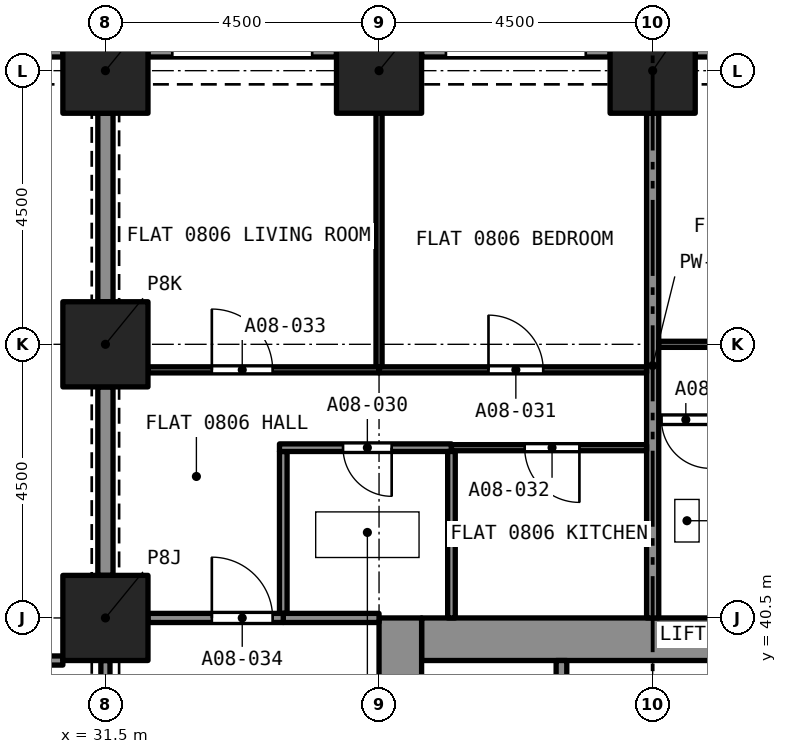
"""IFC4 building model, lengths in metres.
Left out: names, types, materials, properties, quantities, classifications, styles, units other than length and angle.
Written with IfcOpenShell. Run it as: python <this file> out.ifc"""

import sys

from ifc_helpers import new_model, si_unit, direction, frame, frame_2d, origin, origin_2d, place, context, subcontext, project, spatial, rectangle, extrude, element, fill, save


model = new_model("IFC4")
c1 = context("Model", 3, precision=1e-05, world=origin(), true_north=direction((0.0, 1.0)))
c2 = subcontext(c1, "Body", "Model", "MODEL_VIEW")
j1 = project(units=[si_unit("LENGTHUNIT", "METRE"), si_unit("PLANEANGLEUNIT", "RADIAN")], contexts=[c1])
p1 = place(None, origin())
s1 = spatial("IfcSite", under=j1, at=p1, CompositionType="ELEMENT")
p2 = place(p1, origin())
s2 = spatial("IfcBuilding", under=s1, at=p2, CompositionType="ELEMENT")
p3 = place(p2, frame((0.0, 0.0, 36.8)))
s3 = spatial("IfcBuildingStorey", under=s2, at=p3, CompositionType="ELEMENT", Elevation=36.8)
for number, where, z_axis, x_axis in (
    (1, (31.5, 40.5, 0.0), (0.0, 0.0, 1.0), (1.0, 0.0, 0.0)),
    (2, (31.5, 45.0, 0.0), (0.0, 0.0, 1.0), (1.0, 0.0, 0.0)),
    (3, (31.5, 49.5, 0.0), (0.0, 0.0, 1.0), (1.0, 0.0, 0.0)),
    (4, (36.0, 49.5, 0.0), (0.0, 0.0, 1.0), (1.0, 0.0, 0.0)),
    (5, (40.5, 49.5, 0.0), (0.0, 0.0, 1.0), (1.0, 0.0, 0.0)),
):
    element("IfcColumn", number, at=place(p3, frame(where, z_axis=z_axis, x_axis=x_axis)), inside=s3, PredefinedType="COLUMN", context=c2, shape_type="SweptSolid", body=[
        extrude(rectangle(XDim=1.4, YDim=1.4, at=origin_2d()), origin(), (0.0, 0.0, 1.0), 3.2),
    ])
p4 = place(p3, frame((36.7, 40.15, 0.0), z_axis=(0.0, 0.0, 1.0), x_axis=(1.0, 0.0, 0.0)))
e6 = element("IfcWall", 6, at=p4, inside=s3, PredefinedType="SOLIDWALL", context=c2, shape_type="SweptSolid", body=[
    extrude(rectangle(XDim=7.6, YDim=0.7, at=frame_2d((3.8, 0.0))), origin(), (0.0, 0.0, 1.0), 3.2),
])
p5 = place(p3, frame((36.35, 27.0, 0.0), z_axis=(0.0, 0.0, 1.0), x_axis=(0.0, 1.0, 0.0)))
e7 = element("IfcWall", 7, at=p5, inside=s3, PredefinedType="SOLIDWALL", context=c2, shape_type="SweptSolid", body=[
    extrude(rectangle(XDim=13.5, YDim=0.7, at=frame_2d((6.75, 0.0))), origin(), (0.0, 0.0, 1.0), 3.2),
])
p6 = place(p5, frame((8.95, 0.0, 0.0)))
e8 = element("IfcOpeningElement", 8, at=p6, cuts=e7, PredefinedType="OPENING", context=c2, shape_type="SweptSolid", body=[
    extrude(rectangle(XDim=1.2, YDim=2.1, at=frame_2d((0.6, 1.05))), frame((0.0, 0.36, 0.0), z_axis=(0.0, -1.0, 0.0), x_axis=(1.0, 0.0, 0.0)), (0.0, 0.0, 1.0), 0.72),
])
p7 = place(p3, frame((41.2, 49.875, 0.0), z_axis=(0.0, 0.0, 1.0), x_axis=(1.0, 0.0, 0.0)))
e9 = element("IfcWall", 9, at=p7, inside=s3, PredefinedType="SOLIDWALL", context=c2, shape_type="SweptSolid", body=[
    extrude(rectangle(XDim=3.1, YDim=0.3, at=frame_2d((1.55, 0.0))), origin(), (0.0, 0.0, 1.0), 3.2),
])
p8 = place(p7, frame((0.4, 0.0, 0.45)))
e10 = element("IfcOpeningElement", 10, at=p8, cuts=e9, PredefinedType="OPENING", context=c2, shape_type="SweptSolid", body=[
    extrude(rectangle(XDim=2.3, YDim=1.95, at=frame_2d((1.15, 0.975))), frame((0.0, 0.16, 0.0), z_axis=(0.0, -1.0, 0.0), x_axis=(1.0, 0.0, 0.0)), (0.0, 0.0, 1.0), 0.32),
])
p9 = place(p3, frame((36.7, 49.875, 0.0), z_axis=(0.0, 0.0, 1.0), x_axis=(1.0, 0.0, 0.0)))
e11 = element("IfcWall", 11, at=p9, inside=s3, PredefinedType="SOLIDWALL", context=c2, shape_type="SweptSolid", body=[
    extrude(rectangle(XDim=3.1, YDim=0.3, at=frame_2d((1.55, 0.0))), origin(), (0.0, 0.0, 1.0), 3.2),
])
p10 = place(p9, frame((0.4, 0.0, 0.45)))
e12 = element("IfcOpeningElement", 12, at=p10, cuts=e11, PredefinedType="OPENING", context=c2, shape_type="SweptSolid", body=[
    extrude(rectangle(XDim=2.3, YDim=1.95, at=frame_2d((1.15, 0.975))), frame((0.0, 0.16, 0.0), z_axis=(0.0, -1.0, 0.0), x_axis=(1.0, 0.0, 0.0)), (0.0, 0.0, 1.0), 0.32),
])
p11 = place(p3, frame((32.2, 49.875, 0.0), z_axis=(0.0, 0.0, 1.0), x_axis=(1.0, 0.0, 0.0)))
e13 = element("IfcWall", 13, at=p11, inside=s3, PredefinedType="SOLIDWALL", context=c2, shape_type="SweptSolid", body=[
    extrude(rectangle(XDim=3.1, YDim=0.3, at=frame_2d((1.55, 0.0))), origin(), (0.0, 0.0, 1.0), 3.2),
])
p12 = place(p11, frame((0.4, 0.0, 0.45)))
e14 = element("IfcOpeningElement", 14, at=p12, cuts=e13, PredefinedType="OPENING", context=c2, shape_type="SweptSolid", body=[
    extrude(rectangle(XDim=2.3, YDim=1.95, at=frame_2d((1.15, 0.975))), frame((0.0, 0.16, 0.0), z_axis=(0.0, -1.0, 0.0), x_axis=(1.0, 0.0, 0.0)), (0.0, 0.0, 1.0), 0.32),
])
p13 = place(p3, frame((27.7, 49.875, 0.0), z_axis=(0.0, 0.0, 1.0), x_axis=(1.0, 0.0, 0.0)))
e15 = element("IfcWall", 15, at=p13, inside=s3, PredefinedType="SOLIDWALL", context=c2, shape_type="SweptSolid", body=[
    extrude(rectangle(XDim=3.1, YDim=0.3, at=frame_2d((1.55, 0.0))), origin(), (0.0, 0.0, 1.0), 3.2),
])
p14 = place(p13, frame((0.4, 0.0, 0.45)))
e16 = element("IfcOpeningElement", 16, at=p14, cuts=e15, PredefinedType="OPENING", context=c2, shape_type="SweptSolid", body=[
    extrude(rectangle(XDim=2.3, YDim=1.95, at=frame_2d((1.15, 0.975))), frame((0.0, 0.16, 0.0), z_axis=(0.0, -1.0, 0.0), x_axis=(1.0, 0.0, 0.0)), (0.0, 0.0, 1.0), 0.32),
])
p15 = place(p3, frame((41.591, 43.76, 0.0), z_axis=(0.0, 0.0, 1.0), x_axis=(-1.0, 0.0, 0.0)))
e17 = element("IfcWall", 17, at=p15, inside=s3, PredefinedType="PARTITIONING", context=c2, shape_type="SweptSolid", body=[
    extrude(rectangle(XDim=0.991, YDim=0.125, at=frame_2d((0.495, 0.0))), origin(), (0.0, 0.0, 1.0), 2.9),
])
p16 = place(p15, frame((0.146, 0.0, 0.0)))
e18 = element("IfcOpeningElement", 18, at=p16, cuts=e17, PredefinedType="OPENING", context=c2, shape_type="SweptSolid", body=[
    extrude(rectangle(XDim=0.8, YDim=2.1, at=frame_2d((0.4, 1.05))), frame((0.0, 0.073, 0.0), z_axis=(0.0, -1.0, 0.0), x_axis=(1.0, 0.0, 0.0)), (0.0, 0.0, 1.0), 0.145),
])
p17 = place(p3, frame((40.5, 40.5, 0.0), z_axis=(0.0, 0.0, 1.0), x_axis=(0.0, 1.0, 0.0)))
e19 = element("IfcWall", 19, at=p17, inside=s3, PredefinedType="PARTITIONING", context=c2, shape_type="SweptSolid", body=[
    extrude(rectangle(XDim=8.3, YDim=0.2, at=frame_2d((4.15, 0.0))), origin(), (0.0, 0.0, 1.0), 2.9),
])
p18 = place(p3, frame((40.6, 45.0, 0.0), z_axis=(0.0, 0.0, 1.0), x_axis=(1.0, 0.0, 0.0)))
e20 = element("IfcWall", 20, at=p18, inside=s3, PredefinedType="PARTITIONING", context=c2, shape_type="SweptSolid", body=[
    extrude(rectangle(XDim=4.4, YDim=0.1, at=frame_2d((2.2, 0.0))), origin(), (0.0, 0.0, 1.0), 2.9),
])
p19 = place(p18, frame((1.7, 0.0, 0.0)))
e21 = element("IfcOpeningElement", 21, at=p19, cuts=e20, PredefinedType="OPENING", context=c2, shape_type="SweptSolid", body=[
    extrude(rectangle(XDim=0.9, YDim=2.1, at=frame_2d((0.45, 1.05))), frame((0.0, 0.06, 0.0), z_axis=(0.0, -1.0, 0.0), x_axis=(1.0, 0.0, 0.0)), (0.0, 0.0, 1.0), 0.12),
])
p20 = place(p3, frame((34.425, 40.575, 0.0), z_axis=(0.0, 0.0, 1.0), x_axis=(0.0, 1.0, 0.0)))
e22 = element("IfcWall", 22, at=p20, inside=s3, PredefinedType="PARTITIONING", context=c2, shape_type="SweptSolid", body=[
    extrude(rectangle(XDim=2.663, YDim=0.125, at=frame_2d((1.331, 0.0))), origin(), (0.0, 0.0, 1.0), 2.9),
])
p21 = place(p3, frame((37.19, 43.3, 0.0), z_axis=(0.0, 0.0, 1.0), x_axis=(-1.0, 0.0, 0.0)))
e23 = element("IfcWall", 23, at=p21, inside=s3, PredefinedType="PARTITIONING", context=c2, shape_type="SweptSolid", body=[
    extrude(rectangle(XDim=2.828, YDim=0.125, at=frame_2d((1.414, 0.0))), origin(), (0.0, 0.0, 1.0), 2.9),
])
p22 = place(p21, frame((0.983, 0.0, 0.0)))
e24 = element("IfcOpeningElement", 24, at=p22, cuts=e23, PredefinedType="OPENING", context=c2, shape_type="SweptSolid", body=[
    extrude(rectangle(XDim=0.8, YDim=2.1, at=frame_2d((0.4, 1.05))), frame((0.0, 0.073, 0.0), z_axis=(0.0, -1.0, 0.0), x_axis=(1.0, 0.0, 0.0)), (0.0, 0.0, 1.0), 0.145),
])
p23 = place(p3, frame((37.191, 40.5, 0.0), z_axis=(0.0, 0.0, 1.0), x_axis=(0.0, 1.0, 0.0)))
e25 = element("IfcWall", 25, at=p23, inside=s3, PredefinedType="PARTITIONING", context=c2, shape_type="SweptSolid", body=[
    extrude(rectangle(XDim=2.738, YDim=0.125, at=frame_2d((1.369, 0.0))), origin(), (0.0, 0.0, 1.0), 2.9),
])
p24 = place(p3, frame((34.425, 40.5, 0.0), z_axis=(0.0, 0.0, 1.0), x_axis=(1.0, 0.0, 0.0)))
e26 = element("IfcWall", 26, at=p24, inside=s3, PredefinedType="PARTITIONING", context=c2, shape_type="SweptSolid", body=[
    extrude(rectangle(XDim=1.575, YDim=0.15, at=frame_2d((0.788, 0.0))), origin(), (0.0, 0.0, 1.0), 2.9),
])
p25 = place(p3, frame((36.0, 44.58, 0.0), z_axis=(0.0, 0.0, 1.0), x_axis=(1.0, 0.0, 0.0)))
e27 = element("IfcWall", 27, at=p25, inside=s3, PredefinedType="PARTITIONING", context=c2, shape_type="SweptSolid", body=[
    extrude(rectangle(XDim=4.4, YDim=0.1, at=frame_2d((2.2, 0.0))), origin(), (0.0, 0.0, 1.0), 2.9),
])
p26 = place(p25, frame((1.8, 0.0, 0.0)))
e28 = element("IfcOpeningElement", 28, at=p26, cuts=e27, PredefinedType="OPENING", context=c2, shape_type="SweptSolid", body=[
    extrude(rectangle(XDim=0.9, YDim=2.1, at=frame_2d((0.45, 1.05))), frame((0.0, 0.06, 0.0), z_axis=(0.0, -1.0, 0.0), x_axis=(1.0, 0.0, 0.0)), (0.0, 0.0, 1.0), 0.12),
])
p27 = place(p3, frame((36.0, 44.63, 0.0), z_axis=(0.0, 0.0, 1.0), x_axis=(0.0, 1.0, 0.0)))
e29 = element("IfcWall", 29, at=p27, inside=s3, PredefinedType="PARTITIONING", context=c2, shape_type="SweptSolid", body=[
    extrude(rectangle(XDim=4.17, YDim=0.1, at=frame_2d((2.085, 0.0))), origin(), (0.0, 0.0, 1.0), 2.9),
])
p28 = place(p3, frame((40.4, 43.3, 0.0), z_axis=(0.0, 0.0, 1.0), x_axis=(-1.0, 0.0, 0.0)))
e30 = element("IfcWall", 30, at=p28, inside=s3, PredefinedType="PARTITIONING", context=c2, shape_type="SweptSolid", body=[
    extrude(rectangle(XDim=3.209, YDim=0.1, at=frame_2d((1.605, 0.0))), origin(), (0.0, 0.0, 1.0), 2.9),
])
p29 = place(p28, frame((1.105, 0.0, 0.0)))
e31 = element("IfcOpeningElement", 31, at=p29, cuts=e30, PredefinedType="OPENING", context=c2, shape_type="SweptSolid", body=[
    extrude(rectangle(XDim=0.9, YDim=2.1, at=frame_2d((0.45, 1.05))), frame((0.0, 0.06, 0.0), z_axis=(0.0, -1.0, 0.0), x_axis=(1.0, 0.0, 0.0)), (0.0, 0.0, 1.0), 0.12),
])
p30 = place(p3, frame((32.2, 44.58, 0.0), z_axis=(0.0, 0.0, 1.0), x_axis=(1.0, 0.0, 0.0)))
e32 = element("IfcWall", 32, at=p30, inside=s3, PredefinedType="PARTITIONING", context=c2, shape_type="SweptSolid", body=[
    extrude(rectangle(XDim=3.8, YDim=0.1, at=frame_2d((1.9, 0.0))), origin(), (0.0, 0.0, 1.0), 2.9),
])
p31 = place(p30, frame((1.05, 0.0, 0.0)))
e33 = element("IfcOpeningElement", 33, at=p31, cuts=e32, PredefinedType="OPENING", context=c2, shape_type="SweptSolid", body=[
    extrude(rectangle(XDim=1.0, YDim=2.1, at=frame_2d((0.5, 1.05))), frame((0.0, 0.06, 0.0), z_axis=(0.0, -1.0, 0.0), x_axis=(1.0, 0.0, 0.0)), (0.0, 0.0, 1.0), 0.12),
])
p32 = place(p3, frame((31.5, 41.2, 0.0), z_axis=(0.0, 0.0, 1.0), x_axis=(0.0, 1.0, 0.0)))
e34 = element("IfcWall", 34, at=p32, inside=s3, PredefinedType="PARTITIONING", context=c2, shape_type="SweptSolid", body=[
    extrude(rectangle(XDim=3.1, YDim=0.25, at=frame_2d((1.55, 0.0))), origin(), (0.0, 0.0, 1.0), 2.38),
])
p33 = place(p3, frame((32.2, 40.5, 0.0), z_axis=(0.0, 0.0, 1.0), x_axis=(1.0, 0.0, 0.0)))
e35 = element("IfcWall", 35, at=p33, inside=s3, PredefinedType="PARTITIONING", context=c2, shape_type="SweptSolid", body=[
    extrude(rectangle(XDim=2.225, YDim=0.15, at=frame_2d((1.113, 0.0))), origin(), (0.0, 0.0, 1.0), 2.9),
])
p34 = place(p33, frame((1.05, 0.0, 0.0)))
e36 = element("IfcOpeningElement", 36, at=p34, cuts=e35, PredefinedType="OPENING", context=c2, shape_type="SweptSolid", body=[
    extrude(rectangle(XDim=1.0, YDim=2.1, at=frame_2d((0.5, 1.05))), frame((0.0, 0.085, 0.0), z_axis=(0.0, -1.0, 0.0), x_axis=(1.0, 0.0, 0.0)), (0.0, 0.0, 1.0), 0.17),
])
p35 = place(p3, frame((31.5, 45.7, 0.0), z_axis=(0.0, 0.0, 1.0), x_axis=(0.0, 1.0, 0.0)))
e37 = element("IfcWall", 37, at=p35, inside=s3, PredefinedType="PARTITIONING", context=c2, shape_type="SweptSolid", body=[
    extrude(rectangle(XDim=3.1, YDim=0.25, at=frame_2d((1.55, 0.0))), origin(), (0.0, 0.0, 1.0), 2.38),
])
p36 = place(p3, frame((18.7, 39.8, 0.0), z_axis=(0.0, 0.0, 1.0), x_axis=(1.0, 0.0, 0.0)))
e38 = element("IfcWall", 38, at=p36, inside=s3, PredefinedType="PARTITIONING", context=c2, shape_type="SweptSolid", body=[
    extrude(rectangle(XDim=12.1, YDim=0.15, at=frame_2d((6.05, 0.0))), origin(), (0.0, 0.0, 1.0), 2.75),
])
p37 = place(p36, frame((5.55, 0.0, 0.0)))
e39 = element("IfcOpeningElement", 39, at=p37, cuts=e38, PredefinedType="OPENING", context=c2, shape_type="SweptSolid", body=[
    extrude(rectangle(XDim=1.0, YDim=2.1, at=frame_2d((0.5, 1.05))), frame((0.0, 0.085, 0.0), z_axis=(0.0, -1.0, 0.0), x_axis=(1.0, 0.0, 0.0)), (0.0, 0.0, 1.0), 0.17),
])
p38 = place(p3, frame((31.5, 36.7, 0.0), z_axis=(0.0, 0.0, 1.0), x_axis=(0.0, 1.0, 0.0)))
e40 = element("IfcWall", 40, at=p38, inside=s3, PredefinedType="PARTITIONING", context=c2, shape_type="SweptSolid", body=[
    extrude(rectangle(XDim=3.1, YDim=0.15, at=frame_2d((1.55, 0.0))), origin(), (0.0, 0.0, 1.0), 2.38),
])
p39 = place(p38, frame((0.95, 0.0, 0.0)))
e41 = element("IfcOpeningElement", 41, at=p39, cuts=e40, PredefinedType="OPENING", context=c2, shape_type="SweptSolid", body=[
    extrude(rectangle(XDim=1.2, YDim=2.1, at=frame_2d((0.6, 1.05))), frame((0.0, 0.085, 0.0), z_axis=(0.0, -1.0, 0.0), x_axis=(1.0, 0.0, 0.0)), (0.0, 0.0, 1.0), 0.17),
])
p40 = place(p3, frame((39.0, 37.5, 0.0), z_axis=(0.0, 0.0, 1.0), x_axis=(0.0, 1.0, 0.0)))
e42 = element("IfcWall", 42, at=p40, inside=s3, PredefinedType="SOLIDWALL", context=c2, shape_type="SweptSolid", body=[
    extrude(rectangle(XDim=2.3, YDim=0.175, at=frame_2d((1.15, 0.0))), origin(), (0.0, 0.0, 1.0), 2.9),
])
p41 = place(p16, origin())
e43 = element("IfcDoor", 43, at=p41, inside=s3, OperationType="SINGLE_SWING_RIGHT", PredefinedType="DOOR", context=c2, shape_type="SweptSolid", body=[
    extrude(rectangle(XDim=0.8, YDim=2.1, at=frame_2d((0.4, 1.05))), frame((0.0, 0.025, 0.0), z_axis=(0.0, -1.0, 0.0), x_axis=(1.0, 0.0, 0.0)), (0.0, 0.0, 1.0), 0.05),
])
fill(e18, e43)
p42 = place(p22, origin())
e44 = element("IfcDoor", 44, at=p42, inside=s3, OperationType="SINGLE_SWING_LEFT", PredefinedType="DOOR", context=c2, shape_type="SweptSolid", body=[
    extrude(rectangle(XDim=0.8, YDim=2.1, at=frame_2d((0.4, 1.05))), frame((0.0, 0.025, 0.0), z_axis=(0.0, -1.0, 0.0), x_axis=(1.0, 0.0, 0.0)), (0.0, 0.0, 1.0), 0.05),
])
fill(e24, e44)
p43 = place(p26, origin())
e45 = element("IfcDoor", 45, at=p43, inside=s3, OperationType="SINGLE_SWING_RIGHT", PredefinedType="DOOR", context=c2, shape_type="SweptSolid", body=[
    extrude(rectangle(XDim=0.9, YDim=2.1, at=frame_2d((0.45, 1.05))), frame((0.0, 0.025, 0.0), z_axis=(0.0, -1.0, 0.0), x_axis=(1.0, 0.0, 0.0)), (0.0, 0.0, 1.0), 0.05),
])
fill(e28, e45)
p44 = place(p29, origin())
e46 = element("IfcDoor", 46, at=p44, inside=s3, OperationType="SINGLE_SWING_LEFT", PredefinedType="DOOR", context=c2, shape_type="SweptSolid", body=[
    extrude(rectangle(XDim=0.9, YDim=2.1, at=frame_2d((0.45, 1.05))), frame((0.0, 0.025, 0.0), z_axis=(0.0, -1.0, 0.0), x_axis=(1.0, 0.0, 0.0)), (0.0, 0.0, 1.0), 0.05),
])
fill(e31, e46)
p45 = place(p31, origin())
e47 = element("IfcDoor", 47, at=p45, inside=s3, OperationType="SINGLE_SWING_LEFT", PredefinedType="DOOR", context=c2, shape_type="SweptSolid", body=[
    extrude(rectangle(XDim=1.0, YDim=2.1, at=frame_2d((0.5, 1.05))), frame((0.0, 0.025, 0.0), z_axis=(0.0, -1.0, 0.0), x_axis=(1.0, 0.0, 0.0)), (0.0, 0.0, 1.0), 0.05),
])
fill(e33, e47)
p46 = place(p34, origin())
e48 = element("IfcDoor", 48, at=p46, inside=s3, OperationType="SINGLE_SWING_RIGHT", PredefinedType="DOOR", context=c2, shape_type="SweptSolid", body=[
    extrude(rectangle(XDim=1.0, YDim=2.1, at=frame_2d((0.5, 1.05))), frame((0.0, 0.025, 0.0), z_axis=(0.0, -1.0, 0.0), x_axis=(1.0, 0.0, 0.0)), (0.0, 0.0, 1.0), 0.05),
])
fill(e36, e48)
save(model, sys.argv[1])
